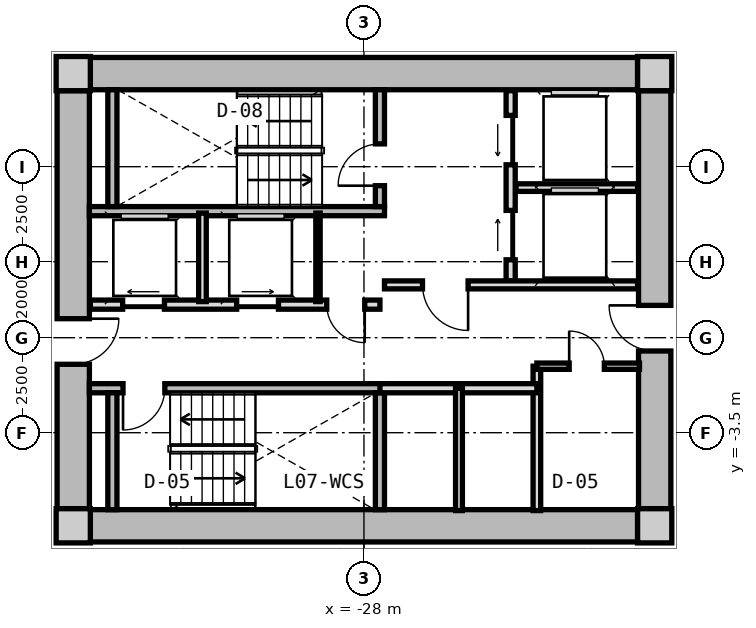
"""IFC4 building model, lengths in metres.
Left out: names, types, materials, properties, quantities, classifications, styles, units other than length and angle.
Written with IfcOpenShell. Run it as: python <this file> out.ifc"""

import sys

from ifc_helpers import new_model, si_unit, direction, frame, frame_2d, origin, origin_2d, place, context, subcontext, project, spatial, rectangle, extrude, source, transform, mapped, element, fill, save


model = new_model("IFC4")
c1 = context("Model", 3, precision=1e-05, world=origin(), true_north=direction((0.0, 1.0)))
c2 = subcontext(c1, "Body", "Model", "MODEL_VIEW")
j1 = project(units=[si_unit("LENGTHUNIT", "METRE"), si_unit("PLANEANGLEUNIT", "RADIAN")], contexts=[c1])
p1 = place(None, origin())
s1 = spatial("IfcSite", under=j1, at=p1, CompositionType="ELEMENT")
p2 = place(p1, origin())
s2 = spatial("IfcBuilding", under=s1, at=p2, CompositionType="ELEMENT")
p3 = place(p2, frame((0.0, 0.0, 27.7)))
s3 = spatial("IfcBuildingStorey", under=s2, at=p3, CompositionType="ELEMENT", Elevation=27.7)
m1 = source(origin(), c2, "Body", "SweptSolid", [
    extrude(rectangle(XDim=0.9, YDim=0.9, at=origin_2d()), origin(), (0.0, 0.0, 1.0), 3.05),
])
for number, where, z_axis, x_axis in (
    (1, (-35.65, -5.95, 0.0), (0.0, 0.0, 1.0), (1.0, 0.0, 0.0)),
    (2, (-20.35, -5.95, 0.0), (0.0, 0.0, 1.0), (1.0, 0.0, 0.0)),
    (3, (-20.35, 5.95, 0.0), (0.0, 0.0, 1.0), (1.0, 0.0, 0.0)),
    (4, (-35.65, 5.95, 0.0), (0.0, 0.0, 1.0), (1.0, 0.0, 0.0)),
):
    element("IfcColumn", number, at=place(p3, frame(where, z_axis=z_axis, x_axis=x_axis)), inside=s3, PredefinedType="COLUMN", context=c2, shape_type="MappedRepresentation", body=[
        mapped(m1, transform((0.0, 0.0, 0.0), x_axis=(1.0, 0.0, 0.0), y_axis=(0.0, 1.0, 0.0), z_axis=(0.0, 0.0, 1.0), scale=1.0)),
    ])
m2 = source(origin(), c2, "Body", "SweptSolid", [
    extrude(rectangle(XDim=14.4, YDim=0.85, at=frame_2d((7.2, 0.0))), origin(), (0.0, 0.0, 1.0), 2.79),
])
for number, where, z_axis, x_axis in (
    (5, (-35.2, 5.95, 0.0), (0.0, 0.0, 1.0), (1.0, 0.0, 0.0)),
    (6, (-20.8, -5.95, 0.0), (0.0, 0.0, 1.0), (-1.0, 0.0, 0.0)),
):
    element("IfcWall", number, at=place(p3, frame(where, z_axis=z_axis, x_axis=x_axis)), inside=s3, PredefinedType="SHEAR", context=c2, shape_type="MappedRepresentation", body=[
        mapped(m2, transform((0.0, 0.0, 0.0), x_axis=(1.0, 0.0, 0.0), y_axis=(0.0, 1.0, 0.0), z_axis=(0.0, 0.0, 1.0), scale=1.0)),
    ])
m3 = source(origin(), c2, "Body", "SweptSolid", [
    extrude(rectangle(XDim=11.0, YDim=0.85, at=frame_2d((5.5, 0.0))), origin(), (0.0, 0.0, 1.0), 2.79),
])
p4 = place(p3, frame((-35.65, -5.5, 0.0), z_axis=(0.0, 0.0, 1.0), x_axis=(0.0, 1.0, 0.0)))
e7 = element("IfcWall", 7, at=p4, inside=s3, PredefinedType="SHEAR", context=c2, shape_type="MappedRepresentation", body=[
    mapped(m3, transform((0.0, 0.0, 0.0), x_axis=(1.0, 0.0, 0.0), y_axis=(0.0, 1.0, 0.0), z_axis=(0.0, 0.0, 1.0), scale=1.0)),
])
p5 = place(p4, frame((3.8, 0.0, 0.0)))
e8 = element("IfcOpeningElement", 8, at=p5, cuts=e7, PredefinedType="OPENING", context=c2, shape_type="SweptSolid", body=[
    extrude(rectangle(XDim=1.2, YDim=2.15, at=frame_2d((0.6, 1.075))), frame((0.0, 0.435, 0.0), z_axis=(0.0, -1.0, 0.0), x_axis=(1.0, 0.0, 0.0)), (0.0, 0.0, 1.0), 0.87),
])
p6 = place(p3, frame((-20.35, 5.5, 0.0), z_axis=(0.0, 0.0, 1.0), x_axis=(0.0, -1.0, 0.0)))
e9 = element("IfcWall", 9, at=p6, inside=s3, PredefinedType="SHEAR", context=c2, shape_type="MappedRepresentation", body=[
    mapped(m3, transform((0.0, 0.0, 0.0), x_axis=(1.0, 0.0, 0.0), y_axis=(0.0, 1.0, 0.0), z_axis=(0.0, 0.0, 1.0), scale=1.0)),
])
p7 = place(p6, frame((5.65, 0.0, 0.0)))
e10 = element("IfcOpeningElement", 10, at=p7, cuts=e9, PredefinedType="OPENING", context=c2, shape_type="SweptSolid", body=[
    extrude(rectangle(XDim=1.2, YDim=2.15, at=frame_2d((0.6, 1.075))), frame((0.0, 0.435, 0.0), z_axis=(0.0, -1.0, 0.0), x_axis=(1.0, 0.0, 0.0)), (0.0, 0.0, 1.0), 0.87),
])
m4 = source(origin(), c2, "Body", "SweptSolid", [
    extrude(rectangle(XDim=7.765, YDim=0.24, at=frame_2d((3.883, 0.0))), origin(), (0.0, 0.0, 1.0), 2.79),
])
p8 = place(p3, frame((-35.225, 2.33, 0.0), z_axis=(0.0, 0.0, 1.0), x_axis=(1.0, 0.0, 0.0)))
e11 = element("IfcWall", 11, at=p8, inside=s3, PredefinedType="PARTITIONING", context=c2, shape_type="MappedRepresentation", body=[
    mapped(m4, transform((0.0, 0.0, 0.0), x_axis=(1.0, 0.0, 0.0), y_axis=(0.0, 1.0, 0.0), z_axis=(0.0, 0.0, 1.0), scale=1.0)),
])
m5 = source(origin(), c2, "Body", "SweptSolid", [
    extrude(rectangle(XDim=3.075, YDim=0.24, at=frame_2d((1.538, 0.0))), origin(), (0.0, 0.0, 1.0), 2.79),
])
p9 = place(p3, frame((-34.62, 2.45, 0.0), z_axis=(0.0, 0.0, 1.0), x_axis=(0.0, 1.0, 0.0)))
e12 = element("IfcWall", 12, at=p9, inside=s3, PredefinedType="PARTITIONING", context=c2, shape_type="MappedRepresentation", body=[
    mapped(m5, transform((0.0, 0.0, 0.0), x_axis=(1.0, 0.0, 0.0), y_axis=(0.0, 1.0, 0.0), z_axis=(0.0, 0.0, 1.0), scale=1.0)),
])
p10 = place(p3, frame((-27.58, 2.45, 0.0), z_axis=(0.0, 0.0, 1.0), x_axis=(0.0, 1.0, 0.0)))
e13 = element("IfcWall", 13, at=p10, inside=s3, PredefinedType="PARTITIONING", context=c2, shape_type="MappedRepresentation", body=[
    mapped(m5, transform((0.0, 0.0, 0.0), x_axis=(1.0, 0.0, 0.0), y_axis=(0.0, 1.0, 0.0), z_axis=(0.0, 0.0, 1.0), scale=1.0)),
])
p11 = place(p10, frame((0.55, 0.0, 0.0)))
e14 = element("IfcOpeningElement", 14, at=p11, cuts=e13, PredefinedType="OPENING", context=c2, shape_type="SweptSolid", body=[
    extrude(rectangle(XDim=1.1, YDim=2.15, at=frame_2d((0.55, 1.075))), frame((0.0, 0.13, 0.0), z_axis=(0.0, -1.0, 0.0), x_axis=(1.0, 0.0, 0.0)), (0.0, 0.0, 1.0), 0.26),
])
p12 = place(p3, frame((-35.225, -2.33, 0.0), z_axis=(0.0, 0.0, 1.0), x_axis=(1.0, 0.0, 0.0)))
e15 = element("IfcWall", 15, at=p12, inside=s3, PredefinedType="PARTITIONING", context=c2, shape_type="MappedRepresentation", body=[
    mapped(m4, transform((0.0, 0.0, 0.0), x_axis=(1.0, 0.0, 0.0), y_axis=(0.0, 1.0, 0.0), z_axis=(0.0, 0.0, 1.0), scale=1.0)),
])
p13 = place(p12, frame((0.885, 0.0, 0.0)))
e16 = element("IfcOpeningElement", 16, at=p13, cuts=e15, PredefinedType="OPENING", context=c2, shape_type="SweptSolid", body=[
    extrude(rectangle(XDim=1.1, YDim=2.15, at=frame_2d((0.55, 1.075))), frame((0.0, 0.13, 0.0), z_axis=(0.0, -1.0, 0.0), x_axis=(1.0, 0.0, 0.0)), (0.0, 0.0, 1.0), 0.26),
])
for number, where, z_axis, x_axis in (
    (17, (-34.62, -5.525, 0.0), (0.0, 0.0, 1.0), (0.0, 1.0, 0.0)),
    (18, (-27.58, -5.525, 0.0), (0.0, 0.0, 1.0), (0.0, 1.0, 0.0)),
):
    element("IfcWall", number, at=place(p3, frame(where, z_axis=z_axis, x_axis=x_axis)), inside=s3, PredefinedType="PARTITIONING", context=c2, shape_type="MappedRepresentation", body=[
        mapped(m5, transform((0.0, 0.0, 0.0), x_axis=(1.0, 0.0, 0.0), y_axis=(0.0, 1.0, 0.0), z_axis=(0.0, 0.0, 1.0), scale=1.0)),
    ])
m6 = source(origin(), c2, "Body", "SweptSolid", [
    extrude(rectangle(XDim=5.0, YDim=0.24, at=frame_2d((2.5, 0.0))), origin(), (0.0, 0.0, 1.0), 2.775),
])
p14 = place(p3, frame((-24.14, 0.5, 0.0), z_axis=(0.0, 0.0, 1.0), x_axis=(0.0, 1.0, 0.0)))
e19 = element("IfcWall", 19, at=p14, inside=s3, PredefinedType="PARTITIONING", context=c2, shape_type="MappedRepresentation", body=[
    mapped(m6, transform((0.0, 0.0, 0.0), x_axis=(1.0, 0.0, 0.0), y_axis=(0.0, 1.0, 0.0), z_axis=(0.0, 0.0, 1.0), scale=1.0)),
])
p15 = place(p14, frame((3.05, 0.0, 0.0)))
e20 = element("IfcOpeningElement", 20, at=p15, cuts=e19, PredefinedType="OPENING", context=c2, shape_type="SweptSolid", body=[
    extrude(rectangle(XDim=1.3, YDim=2.2, at=frame_2d((0.65, 1.1))), frame((0.0, 0.13, 0.0), z_axis=(0.0, -1.0, 0.0), x_axis=(1.0, 0.0, 0.0)), (0.0, 0.0, 1.0), 0.26),
])
p16 = place(p14, frame((0.55, 0.0, 0.0)))
e21 = element("IfcOpeningElement", 21, at=p16, cuts=e19, PredefinedType="OPENING", context=c2, shape_type="SweptSolid", body=[
    extrude(rectangle(XDim=1.3, YDim=2.2, at=frame_2d((0.65, 1.1))), frame((0.0, 0.13, 0.0), z_axis=(0.0, -1.0, 0.0), x_axis=(1.0, 0.0, 0.0)), (0.0, 0.0, 1.0), 0.26),
])
m7 = source(origin(), c2, "Body", "SweptSolid", [
    extrude(rectangle(XDim=3.2, YDim=0.2, at=frame_2d((1.6, 0.0))), origin(), (0.0, 0.0, 1.0), 2.775),
])
p17 = place(p3, frame((-24.0, 2.95, 0.0), z_axis=(0.0, 0.0, 1.0), x_axis=(1.0, 0.0, 0.0)))
e22 = element("IfcWall", 22, at=p17, inside=s3, PredefinedType="PARTITIONING", context=c2, shape_type="MappedRepresentation", body=[
    mapped(m7, transform((0.0, 0.0, 0.0), x_axis=(1.0, 0.0, 0.0), y_axis=(0.0, 1.0, 0.0), z_axis=(0.0, 0.0, 1.0), scale=1.0)),
])
m8 = source(origin(), c2, "Body", "SweptSolid", [
    extrude(rectangle(XDim=6.66, YDim=0.21, at=frame_2d((3.33, 0.0))), origin(), (0.0, 0.0, 1.0), 2.775),
])
p18 = place(p3, frame((-27.46, 0.39, 0.0), z_axis=(0.0, 0.0, 1.0), x_axis=(1.0, 0.0, 0.0)))
e23 = element("IfcWall", 23, at=p18, inside=s3, PredefinedType="PARTITIONING", context=c2, shape_type="MappedRepresentation", body=[
    mapped(m8, transform((0.0, 0.0, 0.0), x_axis=(1.0, 0.0, 0.0), y_axis=(0.0, 1.0, 0.0), z_axis=(0.0, 0.0, 1.0), scale=1.0)),
])
p19 = place(p18, frame((1.0, 0.0, 0.0)))
e24 = element("IfcOpeningElement", 24, at=p19, cuts=e23, PredefinedType="OPENING", context=c2, shape_type="SweptSolid", body=[
    extrude(rectangle(XDim=1.2, YDim=2.15, at=frame_2d((0.6, 1.075))), frame((0.0, 0.115, 0.0), z_axis=(0.0, -1.0, 0.0), x_axis=(1.0, 0.0, 0.0)), (0.0, 0.0, 1.0), 0.23),
])
m9 = source(origin(), c2, "Body", "SweptSolid", [
    extrude(rectangle(XDim=7.62, YDim=0.24, at=frame_2d((3.81, 0.0))), origin(), (0.0, 0.0, 1.0), 2.775),
])
p20 = place(p3, frame((-35.2, -0.13, 0.0), z_axis=(0.0, 0.0, 1.0), x_axis=(1.0, 0.0, 0.0)))
e25 = element("IfcWall", 25, at=p20, inside=s3, PredefinedType="PARTITIONING", context=c2, shape_type="MappedRepresentation", body=[
    mapped(m9, transform((0.0, 0.0, 0.0), x_axis=(1.0, 0.0, 0.0), y_axis=(0.0, 1.0, 0.0), z_axis=(0.0, 0.0, 1.0), scale=1.0)),
])
p21 = place(p20, frame((6.22, 0.0, 0.0)))
e26 = element("IfcOpeningElement", 26, at=p21, cuts=e25, PredefinedType="OPENING", context=c2, shape_type="SweptSolid", body=[
    extrude(rectangle(XDim=1.0, YDim=2.1, at=frame_2d((0.5, 1.05))), frame((0.0, 0.13, 0.0), z_axis=(0.0, -1.0, 0.0), x_axis=(1.0, 0.0, 0.0)), (0.0, 0.0, 1.0), 0.26),
])
p22 = place(p20, frame((0.85, 0.0, 0.0)))
e27 = element("IfcOpeningElement", 27, at=p22, cuts=e25, PredefinedType="OPENING", context=c2, shape_type="SweptSolid", body=[
    extrude(rectangle(XDim=1.1, YDim=2.2, at=frame_2d((0.55, 1.1))), frame((0.0, 0.13, 0.0), z_axis=(0.0, -1.0, 0.0), x_axis=(1.0, 0.0, 0.0)), (0.0, 0.0, 1.0), 0.26),
])
p23 = place(p20, frame((3.85, 0.0, 0.0)))
e28 = element("IfcOpeningElement", 28, at=p23, cuts=e25, PredefinedType="OPENING", context=c2, shape_type="SweptSolid", body=[
    extrude(rectangle(XDim=1.1, YDim=2.2, at=frame_2d((0.55, 1.1))), frame((0.0, 0.13, 0.0), z_axis=(0.0, -1.0, 0.0), x_axis=(1.0, 0.0, 0.0)), (0.0, 0.0, 1.0), 0.26),
])
m10 = source(origin(), c2, "Body", "SweptSolid", [
    extrude(rectangle(XDim=2.33, YDim=0.115, at=frame_2d((1.165, 0.0))), origin(), (0.0, 0.0, 1.0), 2.775),
])
p24 = place(p3, frame((-29.21, -0.05, 0.0), z_axis=(0.0, 0.0, 1.0), x_axis=(0.0, 1.0, 0.0)))
e29 = element("IfcWall", 29, at=p24, inside=s3, PredefinedType="PARTITIONING", context=c2, shape_type="MappedRepresentation", body=[
    mapped(m10, transform((0.0, 0.0, 0.0), x_axis=(1.0, 0.0, 0.0), y_axis=(0.0, 1.0, 0.0), z_axis=(0.0, 0.0, 1.0), scale=1.0)),
])
m11 = source(origin(), c2, "Body", "SweptSolid", [
    extrude(rectangle(XDim=2.33, YDim=0.2, at=frame_2d((1.165, 0.0))), origin(), (0.0, 0.0, 1.0), 2.775),
])
p25 = place(p3, frame((-32.25, -0.05, 0.0), z_axis=(0.0, 0.0, 1.0), x_axis=(0.0, 1.0, 0.0)))
e30 = element("IfcWall", 30, at=p25, inside=s3, PredefinedType="PARTITIONING", context=c2, shape_type="MappedRepresentation", body=[
    mapped(m11, transform((0.0, 0.0, 0.0), x_axis=(1.0, 0.0, 0.0), y_axis=(0.0, 1.0, 0.0), z_axis=(0.0, 0.0, 1.0), scale=1.0)),
])
m12 = source(origin(), c2, "Body", "SweptSolid", [
    extrude(rectangle(XDim=3.8, YDim=0.2, at=frame_2d((1.9, 0.0))), origin(), (0.0, 0.0, 1.0), 2.775),
])
p26 = place(p3, frame((-23.45, -5.55, 0.0), z_axis=(0.0, 0.0, 1.0), x_axis=(0.0, 1.0, 0.0)))
e31 = element("IfcWall", 31, at=p26, inside=s3, PredefinedType="PARTITIONING", context=c2, shape_type="MappedRepresentation", body=[
    mapped(m12, transform((0.0, 0.0, 0.0), x_axis=(1.0, 0.0, 0.0), y_axis=(0.0, 1.0, 0.0), z_axis=(0.0, 0.0, 1.0), scale=1.0)),
])
m13 = source(origin(), c2, "Body", "SweptSolid", [
    extrude(rectangle(XDim=4.13, YDim=0.24, at=frame_2d((2.065, 0.0))), origin(), (0.0, 0.0, 1.0), 2.775),
])
p27 = place(p3, frame((-27.58, -2.33, 0.0), z_axis=(0.0, 0.0, 1.0), x_axis=(1.0, 0.0, 0.0)))
e32 = element("IfcWall", 32, at=p27, inside=s3, PredefinedType="PARTITIONING", context=c2, shape_type="MappedRepresentation", body=[
    mapped(m13, transform((0.0, 0.0, 0.0), x_axis=(1.0, 0.0, 0.0), y_axis=(0.0, 1.0, 0.0), z_axis=(0.0, 0.0, 1.0), scale=1.0)),
])
m14 = source(origin(), c2, "Body", "SweptSolid", [
    extrude(rectangle(XDim=3.22, YDim=0.18, at=frame_2d((1.61, 0.0))), origin(), (0.0, 0.0, 1.0), 2.775),
])
p28 = place(p3, frame((-25.5, -5.55, 0.0), z_axis=(0.0, 0.0, 1.0), x_axis=(0.0, 1.0, 0.0)))
e33 = element("IfcWall", 33, at=p28, inside=s3, PredefinedType="PARTITIONING", context=c2, shape_type="MappedRepresentation", body=[
    mapped(m14, transform((0.0, 0.0, 0.0), x_axis=(1.0, 0.0, 0.0), y_axis=(0.0, 1.0, 0.0), z_axis=(0.0, 0.0, 1.0), scale=1.0)),
])
m15 = source(origin(), c2, "Body", "SweptSolid", [
    extrude(rectangle(XDim=2.7, YDim=0.165, at=frame_2d((1.35, 0.0))), origin(), (0.0, 0.0, 1.0), 2.775),
])
p29 = place(p3, frame((-23.45, -1.75, 0.0), z_axis=(0.0, 0.0, 1.0), x_axis=(1.0, 0.0, 0.0)))
e34 = element("IfcWall", 34, at=p29, inside=s3, PredefinedType="PARTITIONING", context=c2, shape_type="MappedRepresentation", body=[
    mapped(m15, transform((0.0, 0.0, 0.0), x_axis=(1.0, 0.0, 0.0), y_axis=(0.0, 1.0, 0.0), z_axis=(0.0, 0.0, 1.0), scale=1.0)),
])
p30 = place(p29, frame((0.85, 0.0, 0.0)))
e35 = element("IfcOpeningElement", 35, at=p30, cuts=e34, PredefinedType="OPENING", context=c2, shape_type="SweptSolid", body=[
    extrude(rectangle(XDim=0.925, YDim=2.1, at=frame_2d((0.462, 1.05))), frame((0.0, 0.093, 0.0), z_axis=(0.0, -1.0, 0.0), x_axis=(1.0, 0.0, 0.0)), (0.0, 0.0, 1.0), 0.185),
])
m16 = source(origin(), c2, "Body", "SweptSolid", [
    extrude(rectangle(XDim=1.1, YDim=2.15, at=frame_2d((0.55, 1.075))), frame((0.0, 0.025, 0.0), z_axis=(0.0, -1.0, 0.0), x_axis=(1.0, 0.0, 0.0)), (0.0, 0.0, 1.0), 0.05),
])
p31 = place(p11, origin())
e36 = element("IfcDoor", 36, at=p31, inside=s3, OperationType="SINGLE_SWING_LEFT", PredefinedType="DOOR", context=c2, shape_type="MappedRepresentation", body=[
    mapped(m16, transform((0.0, 0.0, 0.0), x_axis=(1.0, 0.0, 0.0), y_axis=(0.0, 1.0, 0.0), z_axis=(0.0, 0.0, 1.0), scale=1.0)),
])
fill(e14, e36)
p32 = place(p13, frame((1.1, 0.0, 0.0), z_axis=(0.0, 0.0, 1.0), x_axis=(-1.0, 0.0, 0.0)))
e37 = element("IfcDoor", 37, at=p32, inside=s3, OperationType="SINGLE_SWING_RIGHT", PredefinedType="DOOR", context=c2, shape_type="MappedRepresentation", body=[
    mapped(m16, transform((0.0, 0.0, 0.0), x_axis=(1.0, 0.0, 0.0), y_axis=(0.0, 1.0, 0.0), z_axis=(0.0, 0.0, 1.0), scale=1.0)),
])
fill(e16, e37)
m17 = source(origin(), c2, "Body", "SweptSolid", [
    extrude(rectangle(XDim=1.3, YDim=2.2, at=frame_2d((0.65, 1.1))), frame((0.0, 0.025, 0.0), z_axis=(0.0, -1.0, 0.0), x_axis=(1.0, 0.0, 0.0)), (0.0, 0.0, 1.0), 0.05),
])
p33 = place(p15, origin())
e38 = element("IfcDoor", 38, at=p33, inside=s3, OperationType="SLIDING_TO_LEFT", PredefinedType="DOOR", context=c2, shape_type="MappedRepresentation", body=[
    mapped(m17, transform((0.0, 0.0, 0.0), x_axis=(1.0, 0.0, 0.0), y_axis=(0.0, 1.0, 0.0), z_axis=(0.0, 0.0, 1.0), scale=1.0)),
])
fill(e20, e38)
p34 = place(p16, origin())
e39 = element("IfcDoor", 39, at=p34, inside=s3, OperationType="SLIDING_TO_RIGHT", PredefinedType="DOOR", context=c2, shape_type="MappedRepresentation", body=[
    mapped(m17, transform((0.0, 0.0, 0.0), x_axis=(1.0, 0.0, 0.0), y_axis=(0.0, 1.0, 0.0), z_axis=(0.0, 0.0, 1.0), scale=1.0)),
])
fill(e21, e39)
m18 = source(origin(), c2, "Body", "SweptSolid", [
    extrude(rectangle(XDim=1.2, YDim=2.15, at=frame_2d((0.6, 1.075))), frame((0.0, 0.025, 0.0), z_axis=(0.0, -1.0, 0.0), x_axis=(1.0, 0.0, 0.0)), (0.0, 0.0, 1.0), 0.05),
])
p35 = place(p19, frame((1.2, 0.0, 0.0), z_axis=(0.0, 0.0, 1.0), x_axis=(-1.0, 0.0, 0.0)))
e40 = element("IfcDoor", 40, at=p35, inside=s3, OperationType="SINGLE_SWING_LEFT", PredefinedType="DOOR", context=c2, shape_type="MappedRepresentation", body=[
    mapped(m18, transform((0.0, 0.0, 0.0), x_axis=(1.0, 0.0, 0.0), y_axis=(0.0, 1.0, 0.0), z_axis=(0.0, 0.0, 1.0), scale=1.0)),
])
fill(e24, e40)
p36 = place(p5, frame((1.2, 0.0, 0.0), z_axis=(0.0, 0.0, 1.0), x_axis=(-1.0, 0.0, 0.0)))
e41 = element("IfcDoor", 41, at=p36, inside=s3, OperationType="SINGLE_SWING_LEFT", PredefinedType="DOOR", context=c2, shape_type="MappedRepresentation", body=[
    mapped(m18, transform((0.0, 0.0, 0.0), x_axis=(1.0, 0.0, 0.0), y_axis=(0.0, 1.0, 0.0), z_axis=(0.0, 0.0, 1.0), scale=1.0)),
])
fill(e8, e41)
p37 = place(p7, frame((1.2, 0.0, 0.0), z_axis=(0.0, 0.0, 1.0), x_axis=(-1.0, 0.0, 0.0)))
e42 = element("IfcDoor", 42, at=p37, inside=s3, OperationType="SINGLE_SWING_RIGHT", PredefinedType="DOOR", context=c2, shape_type="MappedRepresentation", body=[
    mapped(m18, transform((0.0, 0.0, 0.0), x_axis=(1.0, 0.0, 0.0), y_axis=(0.0, 1.0, 0.0), z_axis=(0.0, 0.0, 1.0), scale=1.0)),
])
fill(e10, e42)
m19 = source(origin(), c2, "Body", "SweptSolid", [
    extrude(rectangle(XDim=1.0, YDim=2.1, at=frame_2d((0.5, 1.05))), frame((0.0, 0.025, 0.0), z_axis=(0.0, -1.0, 0.0), x_axis=(1.0, 0.0, 0.0)), (0.0, 0.0, 1.0), 0.05),
])
p38 = place(p21, frame((1.0, 0.0, 0.0), z_axis=(0.0, 0.0, 1.0), x_axis=(-1.0, 0.0, 0.0)))
e43 = element("IfcDoor", 43, at=p38, inside=s3, OperationType="SINGLE_SWING_LEFT", PredefinedType="DOOR", context=c2, shape_type="MappedRepresentation", body=[
    mapped(m19, transform((0.0, 0.0, 0.0), x_axis=(1.0, 0.0, 0.0), y_axis=(0.0, 1.0, 0.0), z_axis=(0.0, 0.0, 1.0), scale=1.0)),
])
fill(e26, e43)
m20 = source(origin(), c2, "Body", "SweptSolid", [
    extrude(rectangle(XDim=1.1, YDim=2.2, at=frame_2d((0.55, 1.1))), frame((0.0, 0.025, 0.0), z_axis=(0.0, -1.0, 0.0), x_axis=(1.0, 0.0, 0.0)), (0.0, 0.0, 1.0), 0.05),
])
p39 = place(p22, origin())
e44 = element("IfcDoor", 44, at=p39, inside=s3, OperationType="SLIDING_TO_LEFT", PredefinedType="DOOR", context=c2, shape_type="MappedRepresentation", body=[
    mapped(m20, transform((0.0, 0.0, 0.0), x_axis=(1.0, 0.0, 0.0), y_axis=(0.0, 1.0, 0.0), z_axis=(0.0, 0.0, 1.0), scale=1.0)),
])
fill(e27, e44)
p40 = place(p23, origin())
e45 = element("IfcDoor", 45, at=p40, inside=s3, OperationType="SLIDING_TO_RIGHT", PredefinedType="DOOR", context=c2, shape_type="MappedRepresentation", body=[
    mapped(m20, transform((0.0, 0.0, 0.0), x_axis=(1.0, 0.0, 0.0), y_axis=(0.0, 1.0, 0.0), z_axis=(0.0, 0.0, 1.0), scale=1.0)),
])
fill(e28, e45)
m21 = source(origin(), c2, "Body", "SweptSolid", [
    extrude(rectangle(XDim=0.925, YDim=2.1, at=frame_2d((0.462, 1.05))), frame((0.0, 0.025, 0.0), z_axis=(0.0, -1.0, 0.0), x_axis=(1.0, 0.0, 0.0)), (0.0, 0.0, 1.0), 0.05),
])
p41 = place(p30, origin())
e46 = element("IfcDoor", 46, at=p41, inside=s3, OperationType="SINGLE_SWING_LEFT", PredefinedType="DOOR", context=c2, shape_type="MappedRepresentation", body=[
    mapped(m21, transform((0.0, 0.0, 0.0), x_axis=(1.0, 0.0, 0.0), y_axis=(0.0, 1.0, 0.0), z_axis=(0.0, 0.0, 1.0), scale=1.0)),
])
fill(e35, e46)
save(model, sys.argv[1])
